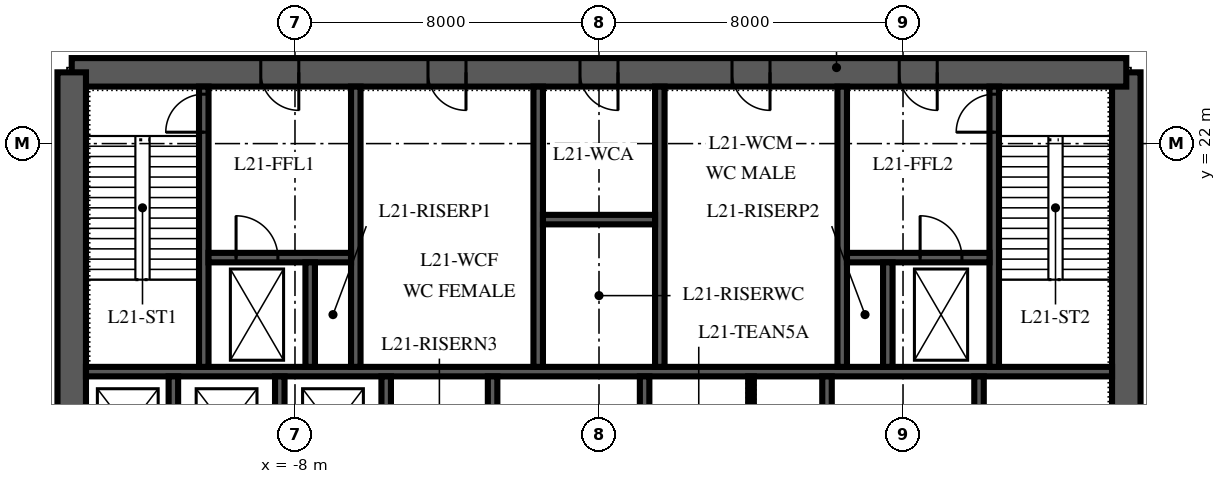
"""IFC4 building model, lengths in metres.
Left out: names, types, materials, properties, quantities, classifications, styles, units other than length and angle.
Written with IfcOpenShell. Run it as: python <this file> out.ifc"""

import sys

from ifc_helpers import new_model, si_unit, direction, frame, frame_2d, origin, place, context, subcontext, project, spatial, polyline, rectangle, outline, extrude, element, fill, save


model = new_model("IFC4")
c1 = context("Model", 3, precision=1e-05, world=origin(), true_north=direction((0.0, 1.0)))
c2 = subcontext(c1, "Body", "Model", "MODEL_VIEW")
j1 = project(units=[si_unit("LENGTHUNIT", "METRE"), si_unit("PLANEANGLEUNIT", "RADIAN")], contexts=[c1])
p1 = place(None, origin())
s1 = spatial("IfcSite", under=j1, at=p1, CompositionType="ELEMENT")
p2 = place(p1, origin())
s2 = spatial("IfcBuilding", under=s1, at=p2, CompositionType="ELEMENT")
p3 = place(p2, frame((0.0, 0.0, 98.0)))
s3 = spatial("IfcBuildingStorey", under=s2, at=p3, CompositionType="ELEMENT", Elevation=98.0)
p4 = place(p3, frame((13.875, 6.125, 0.0), z_axis=(0.0, 0.0, 1.0), x_axis=(0.0, 1.0, 0.0)))
e1 = element("IfcWall", 1, at=p4, inside=s3, PredefinedType="SHEAR", context=c2, shape_type="SweptSolid", body=[
    extrude(outline(polyline([(0.0, -0.375), (17.75, -0.375), (17.75, 0.0), (17.375, 0.0), (17.375, 0.375), (0.375, 0.375), (0.375, 0.0), (0.0, 0.0), (0.0, -0.375)])), origin(), (0.0, 0.0, 1.0), 5.0),
])
p5 = place(p4, frame((4.175, 0.0, 0.0)))
e2 = element("IfcOpeningElement", 2, at=p5, cuts=e1, PredefinedType="OPENING", context=c2, shape_type="SweptSolid", body=[
    extrude(rectangle(XDim=1.8, YDim=2.4, at=frame_2d((0.9, 1.2))), frame((0.0, 0.39, 0.0), z_axis=(0.0, -1.0, 0.0), x_axis=(1.0, 0.0, 0.0)), (0.0, 0.0, 1.0), 0.78),
])
p6 = place(p3, frame((13.875, 23.875, 0.0), z_axis=(0.0, 0.0, 1.0), x_axis=(-1.0, 0.0, 0.0)))
e3 = element("IfcWall", 3, at=p6, inside=s3, PredefinedType="SHEAR", context=c2, shape_type="SweptSolid", body=[
    extrude(rectangle(XDim=27.75, YDim=0.75, at=frame_2d((13.875, 0.0))), origin(), (0.0, 0.0, 1.0), 5.0),
])
p7 = place(p6, frame((21.775, 0.0, 0.0)))
e4 = element("IfcOpeningElement", 4, at=p7, cuts=e3, PredefinedType="OPENING", context=c2, shape_type="SweptSolid", body=[
    extrude(rectangle(XDim=1.0, YDim=2.1, at=frame_2d((0.5, 1.05))), frame((0.0, 0.39, 0.0), z_axis=(0.0, -1.0, 0.0), x_axis=(1.0, 0.0, 0.0)), (0.0, 0.0, 1.0), 0.78),
])
p8 = place(p6, frame((4.975, 0.0, 0.0)))
e5 = element("IfcOpeningElement", 5, at=p8, cuts=e3, PredefinedType="OPENING", context=c2, shape_type="SweptSolid", body=[
    extrude(rectangle(XDim=1.0, YDim=2.1, at=frame_2d((0.5, 1.05))), frame((0.0, 0.39, 0.0), z_axis=(0.0, -1.0, 0.0), x_axis=(1.0, 0.0, 0.0)), (0.0, 0.0, 1.0), 0.78),
])
p9 = place(p6, frame((17.375, 0.0, 0.0)))
e6 = element("IfcOpeningElement", 6, at=p9, cuts=e3, PredefinedType="OPENING", context=c2, shape_type="SweptSolid", body=[
    extrude(rectangle(XDim=1.0, YDim=2.1, at=frame_2d((0.5, 1.05))), frame((0.0, 0.39, 0.0), z_axis=(0.0, -1.0, 0.0), x_axis=(1.0, 0.0, 0.0)), (0.0, 0.0, 1.0), 0.78),
])
p10 = place(p6, frame((13.375, 0.0, 0.0)))
e7 = element("IfcOpeningElement", 7, at=p10, cuts=e3, PredefinedType="OPENING", context=c2, shape_type="SweptSolid", body=[
    extrude(rectangle(XDim=1.0, YDim=2.1, at=frame_2d((0.5, 1.05))), frame((0.0, 0.39, 0.0), z_axis=(0.0, -1.0, 0.0), x_axis=(1.0, 0.0, 0.0)), (0.0, 0.0, 1.0), 0.78),
])
p11 = place(p6, frame((9.375, 0.0, 0.0)))
e8 = element("IfcOpeningElement", 8, at=p11, cuts=e3, PredefinedType="OPENING", context=c2, shape_type="SweptSolid", body=[
    extrude(rectangle(XDim=1.0, YDim=2.1, at=frame_2d((0.5, 1.05))), frame((0.0, 0.39, 0.0), z_axis=(0.0, -1.0, 0.0), x_axis=(1.0, 0.0, 0.0)), (0.0, 0.0, 1.0), 0.78),
])
p12 = place(p3, frame((-13.875, 23.875, 0.0), z_axis=(0.0, 0.0, 1.0), x_axis=(0.0, -1.0, 0.0)))
e9 = element("IfcWall", 9, at=p12, inside=s3, PredefinedType="SHEAR", context=c2, shape_type="SweptSolid", body=[
    extrude(outline(polyline([(0.0, -0.375), (17.75, -0.375), (17.75, 0.0), (17.375, 0.0), (17.375, 0.375), (0.375, 0.375), (0.375, 0.0), (0.0, 0.0), (0.0, -0.375)])), origin(), (0.0, 0.0, 1.0), 5.0),
])
p13 = place(p12, frame((11.775, 0.0, 0.0)))
e10 = element("IfcOpeningElement", 10, at=p13, cuts=e9, PredefinedType="OPENING", context=c2, shape_type="SweptSolid", body=[
    extrude(rectangle(XDim=1.8, YDim=2.4, at=frame_2d((0.9, 1.2))), frame((0.0, 0.39, 0.0), z_axis=(0.0, -1.0, 0.0), x_axis=(1.0, 0.0, 0.0)), (0.0, 0.0, 1.0), 0.78),
])
p14 = place(p3, frame((-13.5, 16.0, 0.0), z_axis=(0.0, 0.0, 1.0), x_axis=(1.0, 0.0, 0.0)))
e11 = element("IfcWall", 11, at=p14, inside=s3, PredefinedType="SHEAR", context=c2, shape_type="SweptSolid", body=[
    extrude(rectangle(XDim=27.0, YDim=0.25, at=frame_2d((13.5, 0.0))), origin(), (0.0, 0.0, 1.0), 5.0),
])
for number, where, z_axis, x_axis in (
    (12, (-11.2, 13.125, 0.0), (0.0, 0.0, 1.0), (0.0, 1.0, 0.0)),
    (13, (-8.4, 13.125, 0.0), (0.0, 0.0, 1.0), (0.0, 1.0, 0.0)),
    (14, (-5.6, 13.125, 0.0), (0.0, 0.0, 1.0), (0.0, 1.0, 0.0)),
    (15, (-2.8, 13.125, 0.0), (0.0, 0.0, 1.0), (0.0, 1.0, 0.0)),
    (16, (1.2, 13.125, 0.0), (0.0, 0.0, 1.0), (0.0, 1.0, 0.0)),
    (17, (6.0, 13.125, 0.0), (0.0, 0.0, 1.0), (0.0, 1.0, 0.0)),
    (18, (10.0, 13.125, 0.0), (0.0, 0.0, 1.0), (0.0, 1.0, 0.0)),
):
    element("IfcWall", number, at=place(p3, frame(where, z_axis=z_axis, x_axis=x_axis)), inside=s3, PredefinedType="SHEAR", context=c2, shape_type="SweptSolid", body=[
        extrude(rectangle(XDim=2.75, YDim=0.25, at=frame_2d((1.375, 0.0))), origin(), (0.0, 0.0, 1.0), 5.0),
    ])
p15 = place(p3, frame((-10.4, 16.125, 0.0), z_axis=(0.0, 0.0, 1.0), x_axis=(0.0, 1.0, 0.0)))
e19 = element("IfcWall", 19, at=p15, inside=s3, PredefinedType="SHEAR", context=c2, shape_type="SweptSolid", body=[
    extrude(rectangle(XDim=7.375, YDim=0.25, at=frame_2d((3.688, 0.0))), origin(), (0.0, 0.0, 1.0), 5.0),
])
p16 = place(p15, frame((6.175, 0.0, 0.0)))
e20 = element("IfcOpeningElement", 20, at=p16, cuts=e19, PredefinedType="OPENING", context=c2, shape_type="SweptSolid", body=[
    extrude(rectangle(XDim=1.0, YDim=2.1, at=frame_2d((0.5, 1.05))), frame((0.0, 0.14, 0.0), z_axis=(0.0, -1.0, 0.0), x_axis=(1.0, 0.0, 0.0)), (0.0, 0.0, 1.0), 0.28),
])
for number, where, z_axis, x_axis in (
    (21, (-6.4, 16.125, 0.0), (0.0, 0.0, 1.0), (0.0, 1.0, 0.0)),
    (22, (-1.6, 16.125, 0.0), (0.0, 0.0, 1.0), (0.0, 1.0, 0.0)),
    (23, (1.6, 16.125, 0.0), (0.0, 0.0, 1.0), (0.0, 1.0, 0.0)),
    (24, (6.4, 16.125, 0.0), (0.0, 0.0, 1.0), (0.0, 1.0, 0.0)),
):
    element("IfcWall", number, at=place(p3, frame(where, z_axis=z_axis, x_axis=x_axis)), inside=s3, PredefinedType="SHEAR", context=c2, shape_type="SweptSolid", body=[
        extrude(rectangle(XDim=7.375, YDim=0.25, at=frame_2d((3.688, 0.0))), origin(), (0.0, 0.0, 1.0), 5.0),
    ])
p17 = place(p3, frame((10.4, 16.125, 0.0), z_axis=(0.0, 0.0, 1.0), x_axis=(0.0, 1.0, 0.0)))
e25 = element("IfcWall", 25, at=p17, inside=s3, PredefinedType="SHEAR", context=c2, shape_type="SweptSolid", body=[
    extrude(rectangle(XDim=7.375, YDim=0.25, at=frame_2d((3.688, 0.0))), origin(), (0.0, 0.0, 1.0), 5.0),
])
p18 = place(p17, frame((6.175, 0.0, 0.0)))
e26 = element("IfcOpeningElement", 26, at=p18, cuts=e25, PredefinedType="OPENING", context=c2, shape_type="SweptSolid", body=[
    extrude(rectangle(XDim=1.0, YDim=2.1, at=frame_2d((0.5, 1.05))), frame((0.0, 0.14, 0.0), z_axis=(0.0, -1.0, 0.0), x_axis=(1.0, 0.0, 0.0)), (0.0, 0.0, 1.0), 0.28),
])
p19 = place(p3, frame((-10.275, 19.0, 0.0), z_axis=(0.0, 0.0, 1.0), x_axis=(1.0, 0.0, 0.0)))
e27 = element("IfcWall", 27, at=p19, inside=s3, PredefinedType="SHEAR", context=c2, shape_type="SweptSolid", body=[
    extrude(rectangle(XDim=3.75, YDim=0.25, at=frame_2d((1.875, 0.0))), origin(), (0.0, 0.0, 1.0), 5.0),
])
p20 = place(p19, frame((0.725, 0.0, 0.0)))
e28 = element("IfcOpeningElement", 28, at=p20, cuts=e27, PredefinedType="OPENING", context=c2, shape_type="SweptSolid", body=[
    extrude(rectangle(XDim=1.1, YDim=2.1, at=frame_2d((0.55, 1.05))), frame((0.0, 0.14, 0.0), z_axis=(0.0, -1.0, 0.0), x_axis=(1.0, 0.0, 0.0)), (0.0, 0.0, 1.0), 0.28),
])
p21 = place(p3, frame((6.525, 19.0, 0.0), z_axis=(0.0, 0.0, 1.0), x_axis=(1.0, 0.0, 0.0)))
e29 = element("IfcWall", 29, at=p21, inside=s3, PredefinedType="SHEAR", context=c2, shape_type="SweptSolid", body=[
    extrude(rectangle(XDim=3.75, YDim=0.25, at=frame_2d((1.875, 0.0))), origin(), (0.0, 0.0, 1.0), 5.0),
])
p22 = place(p21, frame((1.925, 0.0, 0.0)))
e30 = element("IfcOpeningElement", 30, at=p22, cuts=e29, PredefinedType="OPENING", context=c2, shape_type="SweptSolid", body=[
    extrude(rectangle(XDim=1.1, YDim=2.1, at=frame_2d((0.55, 1.05))), frame((0.0, 0.14, 0.0), z_axis=(0.0, -1.0, 0.0), x_axis=(1.0, 0.0, 0.0)), (0.0, 0.0, 1.0), 0.28),
])
for number, where, z_axis, x_axis in (
    (31, (-7.6, 16.125, 0.0), (0.0, 0.0, 1.0), (0.0, 1.0, 0.0)),
    (32, (7.6, 16.125, 0.0), (0.0, 0.0, 1.0), (0.0, 1.0, 0.0)),
):
    element("IfcWall", number, at=place(p3, frame(where, z_axis=z_axis, x_axis=x_axis)), inside=s3, PredefinedType="SHEAR", context=c2, shape_type="SweptSolid", body=[
        extrude(rectangle(XDim=2.75, YDim=0.25, at=frame_2d((1.375, 0.0))), origin(), (0.0, 0.0, 1.0), 5.0),
    ])
p23 = place(p3, frame((-1.475, 20.0, 0.0), z_axis=(0.0, 0.0, 1.0), x_axis=(1.0, 0.0, 0.0)))
e33 = element("IfcWall", 33, at=p23, inside=s3, PredefinedType="SHEAR", context=c2, shape_type="SweptSolid", body=[
    extrude(rectangle(XDim=2.95, YDim=0.25, at=frame_2d((1.475, 0.0))), origin(), (0.0, 0.0, 1.0), 5.0),
])
p24 = place(p3, frame((4.0, 13.125, 0.0), z_axis=(0.0, 0.0, 1.0), x_axis=(0.0, 1.0, 0.0)))
e34 = element("IfcWall", 34, at=p24, inside=s3, PredefinedType="PARTITIONING", context=c2, shape_type="SweptSolid", body=[
    extrude(rectangle(XDim=2.75, YDim=0.15, at=frame_2d((1.375, 0.0))), origin(), (0.0, 0.0, 1.0), 4.85),
])
p25 = place(p7, origin())
e35 = element("IfcDoor", 35, at=p25, inside=s3, OperationType="SINGLE_SWING_RIGHT", PredefinedType="DOOR", context=c2, shape_type="SweptSolid", body=[
    extrude(rectangle(XDim=1.0, YDim=2.1, at=frame_2d((0.5, 1.05))), frame((0.0, 0.375, 0.0), z_axis=(0.0, -1.0, 0.0), x_axis=(1.0, 0.0, 0.0)), (0.0, 0.0, 1.0), 0.75),
])
fill(e4, e35)
p26 = place(p8, origin())
e36 = element("IfcDoor", 36, at=p26, inside=s3, OperationType="SINGLE_SWING_RIGHT", PredefinedType="DOOR", context=c2, shape_type="SweptSolid", body=[
    extrude(rectangle(XDim=1.0, YDim=2.1, at=frame_2d((0.5, 1.05))), frame((0.0, 0.375, 0.0), z_axis=(0.0, -1.0, 0.0), x_axis=(1.0, 0.0, 0.0)), (0.0, 0.0, 1.0), 0.75),
])
fill(e5, e36)
p27 = place(p9, origin())
e37 = element("IfcDoor", 37, at=p27, inside=s3, OperationType="SINGLE_SWING_LEFT", PredefinedType="DOOR", context=c2, shape_type="SweptSolid", body=[
    extrude(rectangle(XDim=1.0, YDim=2.1, at=frame_2d((0.5, 1.05))), frame((0.0, 0.375, 0.0), z_axis=(0.0, -1.0, 0.0), x_axis=(1.0, 0.0, 0.0)), (0.0, 0.0, 1.0), 0.75),
])
fill(e6, e37)
p28 = place(p10, origin())
e38 = element("IfcDoor", 38, at=p28, inside=s3, OperationType="SINGLE_SWING_LEFT", PredefinedType="DOOR", context=c2, shape_type="SweptSolid", body=[
    extrude(rectangle(XDim=1.0, YDim=2.1, at=frame_2d((0.5, 1.05))), frame((0.0, 0.375, 0.0), z_axis=(0.0, -1.0, 0.0), x_axis=(1.0, 0.0, 0.0)), (0.0, 0.0, 1.0), 0.75),
])
fill(e7, e38)
p29 = place(p11, origin())
e39 = element("IfcDoor", 39, at=p29, inside=s3, OperationType="SINGLE_SWING_LEFT", PredefinedType="DOOR", context=c2, shape_type="SweptSolid", body=[
    extrude(rectangle(XDim=1.0, YDim=2.1, at=frame_2d((0.5, 1.05))), frame((0.0, 0.375, 0.0), z_axis=(0.0, -1.0, 0.0), x_axis=(1.0, 0.0, 0.0)), (0.0, 0.0, 1.0), 0.75),
])
fill(e8, e39)
p30 = place(p16, origin())
e40 = element("IfcDoor", 40, at=p30, inside=s3, OperationType="SINGLE_SWING_LEFT", PredefinedType="DOOR", context=c2, shape_type="SweptSolid", body=[
    extrude(rectangle(XDim=1.0, YDim=2.1, at=frame_2d((0.5, 1.05))), frame((0.0, 0.125, 0.0), z_axis=(0.0, -1.0, 0.0), x_axis=(1.0, 0.0, 0.0)), (0.0, 0.0, 1.0), 0.25),
])
fill(e20, e40)
p31 = place(p18, origin())
e41 = element("IfcDoor", 41, at=p31, inside=s3, OperationType="SINGLE_SWING_LEFT", PredefinedType="DOOR", context=c2, shape_type="SweptSolid", body=[
    extrude(rectangle(XDim=1.0, YDim=2.1, at=frame_2d((0.5, 1.05))), frame((0.0, 0.125, 0.0), z_axis=(0.0, -1.0, 0.0), x_axis=(1.0, 0.0, 0.0)), (0.0, 0.0, 1.0), 0.25),
])
fill(e26, e41)
p32 = place(p22, origin())
e42 = element("IfcDoor", 42, at=p32, inside=s3, OperationType="SLIDING_TO_RIGHT", PredefinedType="DOOR", context=c2, shape_type="SweptSolid", body=[
    extrude(rectangle(XDim=1.1, YDim=2.1, at=frame_2d((0.55, 1.05))), frame((0.0, 0.125, 0.0), z_axis=(0.0, -1.0, 0.0), x_axis=(1.0, 0.0, 0.0)), (0.0, 0.0, 1.0), 0.25),
])
fill(e30, e42)
p33 = place(p20, origin())
e43 = element("IfcDoor", 43, at=p33, inside=s3, OperationType="SLIDING_TO_RIGHT", PredefinedType="DOOR", context=c2, shape_type="SweptSolid", body=[
    extrude(rectangle(XDim=1.1, YDim=2.1, at=frame_2d((0.55, 1.05))), frame((0.0, 0.125, 0.0), z_axis=(0.0, -1.0, 0.0), x_axis=(1.0, 0.0, 0.0)), (0.0, 0.0, 1.0), 0.25),
])
fill(e28, e43)
save(model, sys.argv[1])
